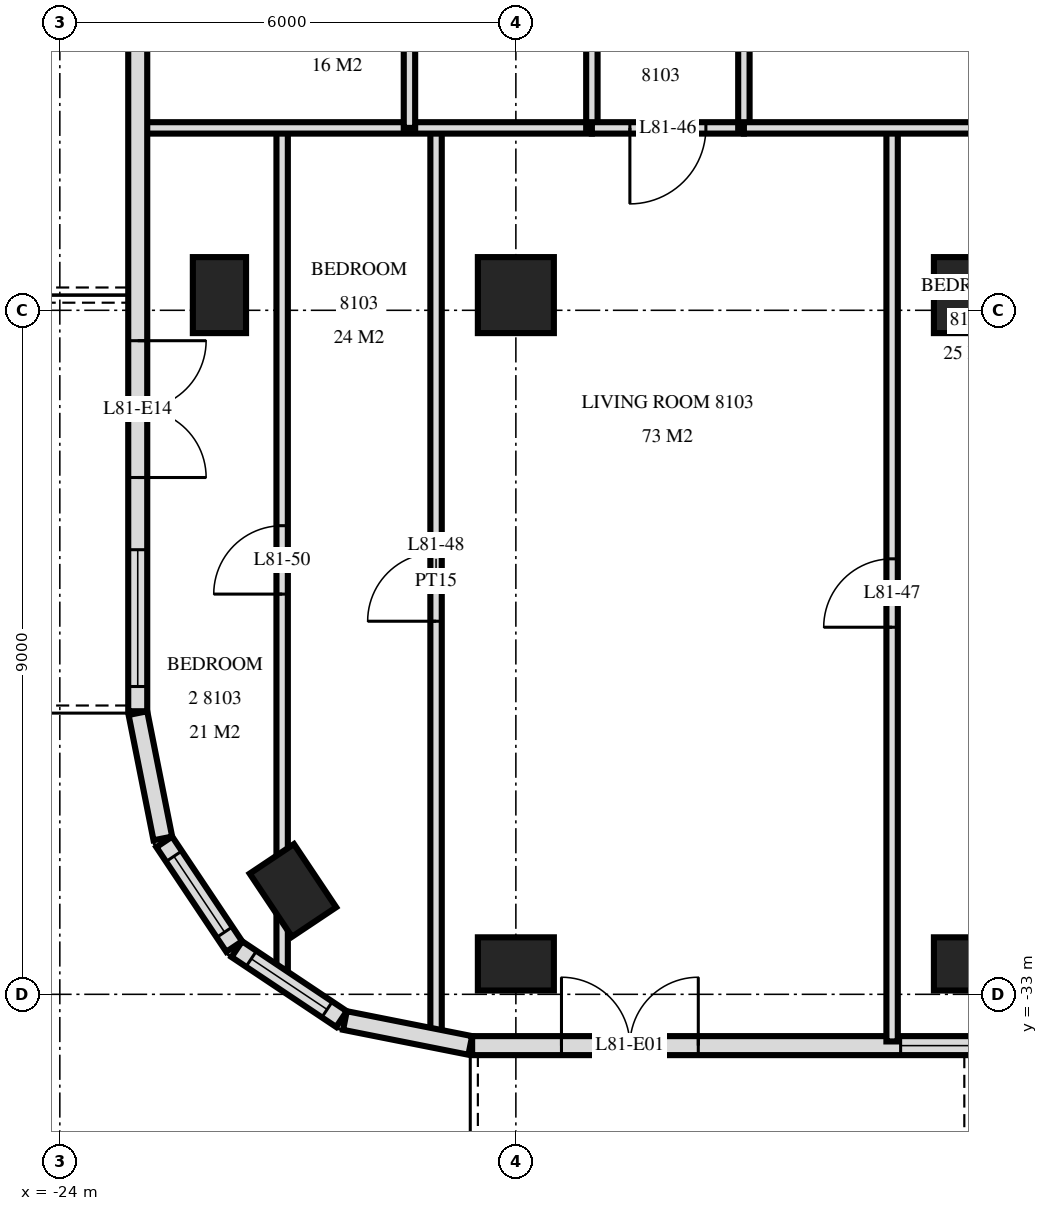
"""IFC4 building model, lengths in metres.
Left out: names, types, materials, properties, quantities, classifications, styles, units other than length and angle.
Written with IfcOpenShell. Run it as: python <this file> out.ifc"""

import sys

from ifc_helpers import new_model, si_unit, direction, frame, frame_2d, origin, origin_2d, place, context, subcontext, project, spatial, rectangle, extrude, element, fill, save


model = new_model("IFC4")
c1 = context("Model", 3, precision=1e-05, world=origin(), true_north=direction((0.0, 1.0)))
c2 = subcontext(c1, "Body", "Model", "MODEL_VIEW")
j1 = project(units=[si_unit("LENGTHUNIT", "METRE"), si_unit("PLANEANGLEUNIT", "RADIAN")], contexts=[c1])
p1 = place(None, origin())
s1 = spatial("IfcSite", under=j1, at=p1, CompositionType="ELEMENT")
p2 = place(p1, origin())
s2 = spatial("IfcBuilding", under=s1, at=p2, CompositionType="ELEMENT")
p3 = place(p2, frame((0.0, 0.0, 305.1)))
s3 = spatial("IfcBuildingStorey", under=s2, at=p3, CompositionType="ELEMENT", Elevation=305.1)
for number, where, z_axis, x_axis in (
    (1, (-21.9, -23.8, 0.0), (0.0, 0.0, 1.0), (0.0, 1.0, 0.0)),
    (2, (-20.933, -31.633, 0.0), (0.0, 0.0, 1.0), (-0.556, 0.831, 0.0)),
    (3, (-18.0, -32.6, 0.0), (0.0, 0.0, 1.0), (1.0, 0.0, 0.0)),
):
    element("IfcColumn", number, at=place(p3, frame(where, z_axis=z_axis, x_axis=x_axis)), inside=s3, PredefinedType="COLUMN", context=c2, shape_type="SweptSolid", body=[
        extrude(rectangle(XDim=1.0, YDim=0.7, at=origin_2d()), origin(), (0.0, 0.0, 1.0), 3.5),
    ])
p4 = place(p3, frame((-18.0, -23.8, 0.0), z_axis=(0.0, 0.0, 1.0), x_axis=(1.0, 0.0, 0.0)))
e4 = element("IfcColumn", 4, at=p4, inside=s3, PredefinedType="COLUMN", context=c2, shape_type="SweptSolid", body=[
    extrude(rectangle(XDim=1.0, YDim=1.0, at=origin_2d()), origin(), (0.0, 0.0, 1.0), 3.5),
])
p5 = place(p3, frame((-12.0, -32.6, 0.0), z_axis=(0.0, 0.0, 1.0), x_axis=(1.0, 0.0, 0.0)))
e5 = element("IfcColumn", 5, at=p5, inside=s3, PredefinedType="COLUMN", context=c2, shape_type="SweptSolid", body=[
    extrude(rectangle(XDim=1.0, YDim=0.7, at=origin_2d()), origin(), (0.0, 0.0, 1.0), 3.5),
])
p6 = place(p3, frame((-12.0, -23.8, 0.0), z_axis=(0.0, 0.0, 1.0), x_axis=(1.0, 0.0, 0.0)))
e6 = element("IfcColumn", 6, at=p6, inside=s3, PredefinedType="COLUMN", context=c2, shape_type="SweptSolid", body=[
    extrude(rectangle(XDim=1.0, YDim=1.0, at=origin_2d()), origin(), (0.0, 0.0, 1.0), 3.5),
])
p7 = place(p3, frame((-22.973, -29.3, 0.0), z_axis=(0.0, 0.0, 1.0), x_axis=(0.19513878023, -0.980775640221, 0.0)))
e7 = element("IfcWall", 7, at=p7, inside=s3, PredefinedType="SOLIDWALL", context=c2, shape_type="SweptSolid", body=[
    extrude(rectangle(XDim=1.681, YDim=0.25, at=frame_2d((0.841, 0.0))), origin(), (0.0, 0.0, 1.0), 3.2),
])
p8 = place(p3, frame((-22.626, -30.994, 0.0), z_axis=(0.0, 0.0, 1.0), x_axis=(0.55555029066, -0.831482937015, 0.0)))
e8 = element("IfcWall", 8, at=p8, inside=s3, PredefinedType="SOLIDWALL", context=c2, shape_type="SweptSolid", body=[
    extrude(rectangle(XDim=1.656, YDim=0.25, at=frame_2d((0.828, 0.0))), origin(), (0.0, 0.0, 1.0), 3.2),
])
p9 = place(p8, frame((0.228, 0.0, 0.9)))
e9 = element("IfcOpeningElement", 9, at=p9, cuts=e8, PredefinedType="OPENING", context=c2, shape_type="SweptSolid", body=[
    extrude(rectangle(XDim=1.2, YDim=1.5, at=frame_2d((0.6, 0.75))), frame((0.0, 0.135, 0.0), z_axis=(0.0, -1.0, 0.0), x_axis=(1.0, 0.0, 0.0)), (0.0, 0.0, 1.0), 0.27),
])
p10 = place(p3, frame((-21.671, -32.406, 0.0), z_axis=(0.0, 0.0, 1.0), x_axis=(0.831482937015, -0.55555029066, 0.0)))
e10 = element("IfcWall", 10, at=p10, inside=s3, PredefinedType="SOLIDWALL", context=c2, shape_type="SweptSolid", body=[
    extrude(rectangle(XDim=1.656, YDim=0.25, at=frame_2d((0.828, 0.0))), origin(), (0.0, 0.0, 1.0), 3.2),
])
p11 = place(p10, frame((0.228, 0.0, 0.9)))
e11 = element("IfcOpeningElement", 11, at=p11, cuts=e10, PredefinedType="OPENING", context=c2, shape_type="SweptSolid", body=[
    extrude(rectangle(XDim=1.2, YDim=1.5, at=frame_2d((0.6, 0.75))), frame((0.0, 0.135, 0.0), z_axis=(0.0, -1.0, 0.0), x_axis=(1.0, 0.0, 0.0)), (0.0, 0.0, 1.0), 0.27),
])
p12 = place(p3, frame((-20.249, -33.344, 0.0), z_axis=(0.0, 0.0, 1.0), x_axis=(0.980770110232, -0.195166572128, 0.0)))
e12 = element("IfcWall", 12, at=p12, inside=s3, PredefinedType="SOLIDWALL", context=c2, shape_type="SweptSolid", body=[
    extrude(rectangle(XDim=1.681, YDim=0.25, at=frame_2d((0.841, 0.0))), origin(), (0.0, 0.0, 1.0), 3.2),
])
p13 = place(p3, frame((-18.575, -33.675, 0.0), z_axis=(0.0, 0.0, 1.0), x_axis=(1.0, 0.0, 0.0)))
e13 = element("IfcWall", 13, at=p13, inside=s3, PredefinedType="SOLIDWALL", context=c2, shape_type="SweptSolid", body=[
    extrude(rectangle(XDim=37.151, YDim=0.25, at=frame_2d((18.575, 0.0))), origin(), (0.0, 0.0, 1.0), 3.2),
])
p14 = place(p13, frame((1.175, 0.0, 0.0)))
e14 = element("IfcOpeningElement", 14, at=p14, cuts=e13, PredefinedType="OPENING", context=c2, shape_type="SweptSolid", body=[
    extrude(rectangle(XDim=1.8, YDim=2.4, at=frame_2d((0.9, 1.2))), frame((0.0, 0.135, 0.0), z_axis=(0.0, -1.0, 0.0), x_axis=(1.0, 0.0, 0.0)), (0.0, 0.0, 1.0), 0.27),
])
p15 = place(p13, frame((5.637, 0.0, 0.9)))
e15 = element("IfcOpeningElement", 15, at=p15, cuts=e13, PredefinedType="OPENING", context=c2, shape_type="SweptSolid", body=[
    extrude(rectangle(XDim=1.8, YDim=1.5, at=frame_2d((0.9, 0.75))), frame((0.0, 0.135, 0.0), z_axis=(0.0, -1.0, 0.0), x_axis=(1.0, 0.0, 0.0)), (0.0, 0.0, 1.0), 0.27),
])
p16 = place(p13, frame((7.663, 0.0, 0.0)))
e16 = element("IfcOpeningElement", 16, at=p16, cuts=e13, PredefinedType="OPENING", context=c2, shape_type="SweptSolid", body=[
    extrude(rectangle(XDim=1.8, YDim=2.4, at=frame_2d((0.9, 1.2))), frame((0.0, 0.135, 0.0), z_axis=(0.0, -1.0, 0.0), x_axis=(1.0, 0.0, 0.0)), (0.0, 0.0, 1.0), 0.27),
])
p17 = place(p13, frame((9.875, 0.0, 0.9)))
e17 = element("IfcOpeningElement", 17, at=p17, cuts=e13, PredefinedType="OPENING", context=c2, shape_type="SweptSolid", body=[
    extrude(rectangle(XDim=2.4, YDim=1.5, at=frame_2d((1.2, 0.75))), frame((0.0, 0.135, 0.0), z_axis=(0.0, -1.0, 0.0), x_axis=(1.0, 0.0, 0.0)), (0.0, 0.0, 1.0), 0.27),
])
p18 = place(p13, frame((13.175, 0.0, 0.0)))
e18 = element("IfcOpeningElement", 18, at=p18, cuts=e13, PredefinedType="OPENING", context=c2, shape_type="SweptSolid", body=[
    extrude(rectangle(XDim=1.8, YDim=2.4, at=frame_2d((0.9, 1.2))), frame((0.0, 0.135, 0.0), z_axis=(0.0, -1.0, 0.0), x_axis=(1.0, 0.0, 0.0)), (0.0, 0.0, 1.0), 0.27),
])
p19 = place(p13, frame((15.875, 0.0, 0.9)))
e19 = element("IfcOpeningElement", 19, at=p19, cuts=e13, PredefinedType="OPENING", context=c2, shape_type="SweptSolid", body=[
    extrude(rectangle(XDim=2.4, YDim=1.5, at=frame_2d((1.2, 0.75))), frame((0.0, 0.135, 0.0), z_axis=(0.0, -1.0, 0.0), x_axis=(1.0, 0.0, 0.0)), (0.0, 0.0, 1.0), 0.27),
])
p20 = place(p13, frame((19.175, 0.0, 0.0)))
e20 = element("IfcOpeningElement", 20, at=p20, cuts=e13, PredefinedType="OPENING", context=c2, shape_type="SweptSolid", body=[
    extrude(rectangle(XDim=1.8, YDim=2.4, at=frame_2d((0.9, 1.2))), frame((0.0, 0.135, 0.0), z_axis=(0.0, -1.0, 0.0), x_axis=(1.0, 0.0, 0.0)), (0.0, 0.0, 1.0), 0.27),
])
p21 = place(p13, frame((21.875, 0.0, 0.9)))
e21 = element("IfcOpeningElement", 21, at=p21, cuts=e13, PredefinedType="OPENING", context=c2, shape_type="SweptSolid", body=[
    extrude(rectangle(XDim=2.4, YDim=1.5, at=frame_2d((1.2, 0.75))), frame((0.0, 0.135, 0.0), z_axis=(0.0, -1.0, 0.0), x_axis=(1.0, 0.0, 0.0)), (0.0, 0.0, 1.0), 0.27),
])
p22 = place(p13, frame((25.063, 0.0, 0.9)))
e22 = element("IfcOpeningElement", 22, at=p22, cuts=e13, PredefinedType="OPENING", context=c2, shape_type="SweptSolid", body=[
    extrude(rectangle(XDim=1.8, YDim=1.5, at=frame_2d((0.9, 0.75))), frame((0.0, 0.135, 0.0), z_axis=(0.0, -1.0, 0.0), x_axis=(1.0, 0.0, 0.0)), (0.0, 0.0, 1.0), 0.27),
])
p23 = place(p13, frame((27.838, 0.0, 0.0)))
e23 = element("IfcOpeningElement", 23, at=p23, cuts=e13, PredefinedType="OPENING", context=c2, shape_type="SweptSolid", body=[
    extrude(rectangle(XDim=1.8, YDim=2.4, at=frame_2d((0.9, 1.2))), frame((0.0, 0.135, 0.0), z_axis=(0.0, -1.0, 0.0), x_axis=(1.0, 0.0, 0.0)), (0.0, 0.0, 1.0), 0.27),
])
p24 = place(p13, frame((31.175, 0.0, 0.0)))
e24 = element("IfcOpeningElement", 24, at=p24, cuts=e13, PredefinedType="OPENING", context=c2, shape_type="SweptSolid", body=[
    extrude(rectangle(XDim=1.8, YDim=2.4, at=frame_2d((0.9, 1.2))), frame((0.0, 0.135, 0.0), z_axis=(0.0, -1.0, 0.0), x_axis=(1.0, 0.0, 0.0)), (0.0, 0.0, 1.0), 0.27),
])
p25 = place(p3, frame((-13.05, -33.62, 0.0), z_axis=(0.0, 0.0, 1.0), x_axis=(0.0, 1.0, 0.0)))
e25 = element("IfcWall", 25, at=p25, inside=s3, PredefinedType="PARTITIONING", context=c2, shape_type="SweptSolid", body=[
    extrude(rectangle(XDim=12.02, YDim=0.15, at=frame_2d((6.01, 0.0))), origin(), (0.0, 0.0, 1.0), 3.22),
])
p26 = place(p25, frame((5.45, 0.0, 0.0)))
e26 = element("IfcOpeningElement", 26, at=p26, cuts=e25, PredefinedType="OPENING", context=c2, shape_type="SweptSolid", body=[
    extrude(rectangle(XDim=0.9, YDim=2.1, at=frame_2d((0.45, 1.05))), frame((0.0, 0.085, 0.0), z_axis=(0.0, -1.0, 0.0), x_axis=(1.0, 0.0, 0.0)), (0.0, 0.0, 1.0), 0.17),
])
p27 = place(p3, frame((-15.0, -21.6, 0.0), z_axis=(0.0, 0.0, 1.0), x_axis=(0.0, 1.0, 0.0)))
e27 = element("IfcWall", 27, at=p27, inside=s3, PredefinedType="PARTITIONING", context=c2, shape_type="SweptSolid", body=[
    extrude(rectangle(XDim=4.2, YDim=0.15, at=frame_2d((2.1, 0.0))), origin(), (0.0, 0.0, 1.0), 3.22),
])
p28 = place(p27, frame((1.6, 0.0, 0.0)))
e28 = element("IfcOpeningElement", 28, at=p28, cuts=e27, PredefinedType="OPENING", context=c2, shape_type="SweptSolid", body=[
    extrude(rectangle(XDim=1.0, YDim=2.1, at=frame_2d((0.5, 1.05))), frame((0.0, 0.085, 0.0), z_axis=(0.0, -1.0, 0.0), x_axis=(1.0, 0.0, 0.0)), (0.0, 0.0, 1.0), 0.17),
])
p29 = place(p3, frame((-17.0, -21.6, 0.0), z_axis=(0.0, 0.0, 1.0), x_axis=(0.0, 1.0, 0.0)))
e29 = element("IfcWall", 29, at=p29, inside=s3, PredefinedType="PARTITIONING", context=c2, shape_type="SweptSolid", body=[
    extrude(rectangle(XDim=4.2, YDim=0.15, at=frame_2d((2.1, 0.0))), origin(), (0.0, 0.0, 1.0), 3.22),
])
p30 = place(p29, frame((1.6, 0.0, 0.0)))
e30 = element("IfcOpeningElement", 30, at=p30, cuts=e29, PredefinedType="OPENING", context=c2, shape_type="SweptSolid", body=[
    extrude(rectangle(XDim=1.0, YDim=2.1, at=frame_2d((0.5, 1.05))), frame((0.0, 0.085, 0.0), z_axis=(0.0, -1.0, 0.0), x_axis=(1.0, 0.0, 0.0)), (0.0, 0.0, 1.0), 0.17),
])
p31 = place(p3, frame((-19.05, -33.527, 0.0), z_axis=(0.0, 0.0, 1.0), x_axis=(0.0, 1.0, 0.0)))
e31 = element("IfcWall", 31, at=p31, inside=s3, PredefinedType="PARTITIONING", context=c2, shape_type="SweptSolid", body=[
    extrude(rectangle(XDim=11.927, YDim=0.15, at=frame_2d((5.963, 0.0))), origin(), (0.0, 0.0, 1.0), 3.22),
])
p32 = place(p31, frame((5.436, 0.0, 0.0)))
e32 = element("IfcOpeningElement", 32, at=p32, cuts=e31, PredefinedType="OPENING", context=c2, shape_type="SweptSolid", body=[
    extrude(rectangle(XDim=0.9, YDim=2.1, at=frame_2d((0.45, 1.05))), frame((0.0, 0.085, 0.0), z_axis=(0.0, -1.0, 0.0), x_axis=(1.0, 0.0, 0.0)), (0.0, 0.0, 1.0), 0.17),
])
p33 = place(p3, frame((-19.4, -21.6, 0.0), z_axis=(0.0, 0.0, 1.0), x_axis=(0.0, 1.0, 0.0)))
e33 = element("IfcWall", 33, at=p33, inside=s3, PredefinedType="PARTITIONING", context=c2, shape_type="SweptSolid", body=[
    extrude(rectangle(XDim=4.2, YDim=0.15, at=frame_2d((2.1, 0.0))), origin(), (0.0, 0.0, 1.0), 3.22),
])
p34 = place(p3, frame((-21.075, -32.666, 0.0), z_axis=(0.0, 0.0, 1.0), x_axis=(0.0, 1.0, 0.0)))
e34 = element("IfcWall", 34, at=p34, inside=s3, PredefinedType="PARTITIONING", context=c2, shape_type="SweptSolid", body=[
    extrude(rectangle(XDim=11.066, YDim=0.15, at=frame_2d((5.533, 0.0))), origin(), (0.0, 0.0, 1.0), 3.22),
])
p35 = place(p34, frame((4.932, 0.0, 0.0)))
e35 = element("IfcOpeningElement", 35, at=p35, cuts=e34, PredefinedType="OPENING", context=c2, shape_type="SweptSolid", body=[
    extrude(rectangle(XDim=0.9, YDim=2.1, at=frame_2d((0.45, 1.05))), frame((0.0, 0.085, 0.0), z_axis=(0.0, -1.0, 0.0), x_axis=(1.0, 0.0, 0.0)), (0.0, 0.0, 1.0), 0.17),
])
p36 = place(p3, frame((-17.0, -21.6, 0.0), z_axis=(0.0, 0.0, 1.0), x_axis=(1.0, 0.0, 0.0)))
e36 = element("IfcWall", 36, at=p36, inside=s3, PredefinedType="PARTITIONING", context=c2, shape_type="SweptSolid", body=[
    extrude(rectangle(XDim=2.0, YDim=0.15, at=frame_2d((1.0, 0.0))), origin(), (0.0, 0.0, 1.0), 3.22),
])
p37 = place(p36, frame((0.5, 0.0, 0.0)))
e37 = element("IfcOpeningElement", 37, at=p37, cuts=e36, PredefinedType="OPENING", context=c2, shape_type="SweptSolid", body=[
    extrude(rectangle(XDim=1.0, YDim=2.1, at=frame_2d((0.5, 1.05))), frame((0.0, 0.085, 0.0), z_axis=(0.0, -1.0, 0.0), x_axis=(1.0, 0.0, 0.0)), (0.0, 0.0, 1.0), 0.17),
])
p38 = place(p3, frame((-22.92, -21.6, 0.0), z_axis=(0.0, 0.0, 1.0), x_axis=(1.0, 0.0, 0.0)))
e38 = element("IfcWall", 38, at=p38, inside=s3, PredefinedType="PARTITIONING", context=c2, shape_type="SweptSolid", body=[
    extrude(rectangle(XDim=5.92, YDim=0.15, at=frame_2d((2.96, 0.0))), origin(), (0.0, 0.0, 1.0), 3.22),
])
p39 = place(p3, frame((-15.0, -21.6, 0.0), z_axis=(0.0, 0.0, 1.0), x_axis=(1.0, 0.0, 0.0)))
e39 = element("IfcWall", 39, at=p39, inside=s3, PredefinedType="PARTITIONING", context=c2, shape_type="SweptSolid", body=[
    extrude(rectangle(XDim=6.0, YDim=0.15, at=frame_2d((3.0, 0.0))), origin(), (0.0, 0.0, 1.0), 3.22),
])
p40 = place(p39, frame((4.588, 0.0, 0.0)))
e40 = element("IfcOpeningElement", 40, at=p40, cuts=e39, PredefinedType="OPENING", context=c2, shape_type="SweptSolid", body=[
    extrude(rectangle(XDim=0.8, YDim=2.1, at=frame_2d((0.4, 1.05))), frame((0.0, 0.085, 0.0), z_axis=(0.0, -1.0, 0.0), x_axis=(1.0, 0.0, 0.0)), (0.0, 0.0, 1.0), 0.17),
])
p41 = place(p3, frame((-22.975, -8.678, 0.0), z_axis=(0.0, 0.0, 1.0), x_axis=(0.0, -1.0, 0.0)))
e41 = element("IfcWall", 41, at=p41, inside=s3, PredefinedType="SOLIDWALL", context=c2, shape_type="SweptSolid", body=[
    extrude(rectangle(XDim=20.598, YDim=0.25, at=frame_2d((10.299, 0.0))), origin(), (0.0, 0.0, 1.0), 3.2),
])
p42 = place(p41, frame((2.622, 0.0, 0.0)))
e42 = element("IfcOpeningElement", 42, at=p42, cuts=e41, PredefinedType="OPENING", context=c2, shape_type="SweptSolid", body=[
    extrude(rectangle(XDim=1.8, YDim=2.4, at=frame_2d((0.9, 1.2))), frame((0.0, 0.135, 0.0), z_axis=(0.0, -1.0, 0.0), x_axis=(1.0, 0.0, 0.0)), (0.0, 0.0, 1.0), 0.27),
])
p43 = place(p41, frame((6.922, 0.0, 0.9)))
e43 = element("IfcOpeningElement", 43, at=p43, cuts=e41, PredefinedType="OPENING", context=c2, shape_type="SweptSolid", body=[
    extrude(rectangle(XDim=1.2, YDim=1.5, at=frame_2d((0.6, 0.75))), frame((0.0, 0.135, 0.0), z_axis=(0.0, -1.0, 0.0), x_axis=(1.0, 0.0, 0.0)), (0.0, 0.0, 1.0), 0.27),
])
p44 = place(p41, frame((9.922, 0.0, 0.0)))
e44 = element("IfcOpeningElement", 44, at=p44, cuts=e41, PredefinedType="OPENING", context=c2, shape_type="SweptSolid", body=[
    extrude(rectangle(XDim=1.8, YDim=2.4, at=frame_2d((0.9, 1.2))), frame((0.0, 0.135, 0.0), z_axis=(0.0, -1.0, 0.0), x_axis=(1.0, 0.0, 0.0)), (0.0, 0.0, 1.0), 0.27),
])
p45 = place(p41, frame((15.722, 0.0, 0.0)))
e45 = element("IfcOpeningElement", 45, at=p45, cuts=e41, PredefinedType="OPENING", context=c2, shape_type="SweptSolid", body=[
    extrude(rectangle(XDim=1.8, YDim=2.4, at=frame_2d((0.9, 1.2))), frame((0.0, 0.135, 0.0), z_axis=(0.0, -1.0, 0.0), x_axis=(1.0, 0.0, 0.0)), (0.0, 0.0, 1.0), 0.27),
])
p46 = place(p41, frame((18.472, 0.0, 0.9)))
e46 = element("IfcOpeningElement", 46, at=p46, cuts=e41, PredefinedType="OPENING", context=c2, shape_type="SweptSolid", body=[
    extrude(rectangle(XDim=1.8, YDim=1.5, at=frame_2d((0.9, 0.75))), frame((0.0, 0.135, 0.0), z_axis=(0.0, -1.0, 0.0), x_axis=(1.0, 0.0, 0.0)), (0.0, 0.0, 1.0), 0.27),
])
p47 = place(p9, origin())
e47 = element("IfcWindow", 47, at=p47, inside=s3, PartitioningType="SINGLE_PANEL", PredefinedType="WINDOW", context=c2, shape_type="SweptSolid", body=[
    extrude(rectangle(XDim=1.2, YDim=1.5, at=frame_2d((0.6, 0.75))), frame((0.0, 0.03, 0.0), z_axis=(0.0, -1.0, 0.0), x_axis=(1.0, 0.0, 0.0)), (0.0, 0.0, 1.0), 0.06),
])
fill(e9, e47)
p48 = place(p11, origin())
e48 = element("IfcWindow", 48, at=p48, inside=s3, PartitioningType="SINGLE_PANEL", PredefinedType="WINDOW", context=c2, shape_type="SweptSolid", body=[
    extrude(rectangle(XDim=1.2, YDim=1.5, at=frame_2d((0.6, 0.75))), frame((0.0, 0.03, 0.0), z_axis=(0.0, -1.0, 0.0), x_axis=(1.0, 0.0, 0.0)), (0.0, 0.0, 1.0), 0.06),
])
fill(e11, e48)
p49 = place(p14, origin())
e49 = element("IfcDoor", 49, at=p49, inside=s3, OperationType="DOUBLE_DOOR_SINGLE_SWING", PredefinedType="DOOR", context=c2, shape_type="SweptSolid", body=[
    extrude(rectangle(XDim=1.8, YDim=2.4, at=frame_2d((0.9, 1.2))), frame((0.0, 0.025, 0.0), z_axis=(0.0, -1.0, 0.0), x_axis=(1.0, 0.0, 0.0)), (0.0, 0.0, 1.0), 0.05),
])
fill(e14, e49)
p50 = place(p15, origin())
e50 = element("IfcWindow", 50, at=p50, inside=s3, PartitioningType="SINGLE_PANEL", PredefinedType="WINDOW", context=c2, shape_type="SweptSolid", body=[
    extrude(rectangle(XDim=1.8, YDim=1.5, at=frame_2d((0.9, 0.75))), frame((0.0, 0.03, 0.0), z_axis=(0.0, -1.0, 0.0), x_axis=(1.0, 0.0, 0.0)), (0.0, 0.0, 1.0), 0.06),
])
fill(e15, e50)
p51 = place(p45, origin())
e51 = element("IfcDoor", 51, at=p51, inside=s3, OperationType="DOUBLE_DOOR_SINGLE_SWING", PredefinedType="DOOR", context=c2, shape_type="SweptSolid", body=[
    extrude(rectangle(XDim=1.8, YDim=2.4, at=frame_2d((0.9, 1.2))), frame((0.0, 0.025, 0.0), z_axis=(0.0, -1.0, 0.0), x_axis=(1.0, 0.0, 0.0)), (0.0, 0.0, 1.0), 0.05),
])
fill(e45, e51)
p52 = place(p46, origin())
e52 = element("IfcWindow", 52, at=p52, inside=s3, PartitioningType="SINGLE_PANEL", PredefinedType="WINDOW", context=c2, shape_type="SweptSolid", body=[
    extrude(rectangle(XDim=1.8, YDim=1.5, at=frame_2d((0.9, 0.75))), frame((0.0, 0.03, 0.0), z_axis=(0.0, -1.0, 0.0), x_axis=(1.0, 0.0, 0.0)), (0.0, 0.0, 1.0), 0.06),
])
fill(e46, e52)
p53 = place(p37, frame((0.5, 0.0, 0.0), z_axis=(0.0, 0.0, 1.0), x_axis=(-1.0, 0.0, 0.0)))
e53 = element("IfcDoor", 53, at=p53, inside=s3, OperationType="SINGLE_SWING_LEFT", PredefinedType="DOOR", context=c2, shape_type="SweptSolid", body=[
    extrude(rectangle(XDim=1.0, YDim=2.1, at=frame_2d((0.0, 1.05))), frame((0.0, -0.025, 0.0), z_axis=(0.0, 1.0, 0.0), x_axis=(-1.0, 0.0, 0.0)), (0.0, 0.0, 1.0), 0.05),
])
fill(e37, e53)
p54 = place(p26, origin())
e54 = element("IfcDoor", 54, at=p54, inside=s3, OperationType="SINGLE_SWING_RIGHT", PredefinedType="DOOR", context=c2, shape_type="SweptSolid", body=[
    extrude(rectangle(XDim=0.9, YDim=2.1, at=frame_2d((0.45, 1.05))), frame((0.0, 0.025, 0.0), z_axis=(0.0, -1.0, 0.0), x_axis=(1.0, 0.0, 0.0)), (0.0, 0.0, 1.0), 0.05),
])
fill(e26, e54)
p55 = place(p32, origin())
e55 = element("IfcDoor", 55, at=p55, inside=s3, OperationType="SINGLE_SWING_RIGHT", PredefinedType="DOOR", context=c2, shape_type="SweptSolid", body=[
    extrude(rectangle(XDim=0.9, YDim=2.1, at=frame_2d((0.45, 1.05))), frame((0.0, 0.025, 0.0), z_axis=(0.0, -1.0, 0.0), x_axis=(1.0, 0.0, 0.0)), (0.0, 0.0, 1.0), 0.05),
])
fill(e32, e55)
p56 = place(p35, origin())
e56 = element("IfcDoor", 56, at=p56, inside=s3, OperationType="SINGLE_SWING_RIGHT", PredefinedType="DOOR", context=c2, shape_type="SweptSolid", body=[
    extrude(rectangle(XDim=0.9, YDim=2.1, at=frame_2d((0.45, 1.05))), frame((0.0, 0.025, 0.0), z_axis=(0.0, -1.0, 0.0), x_axis=(1.0, 0.0, 0.0)), (0.0, 0.0, 1.0), 0.05),
])
fill(e35, e56)
save(model, sys.argv[1])
